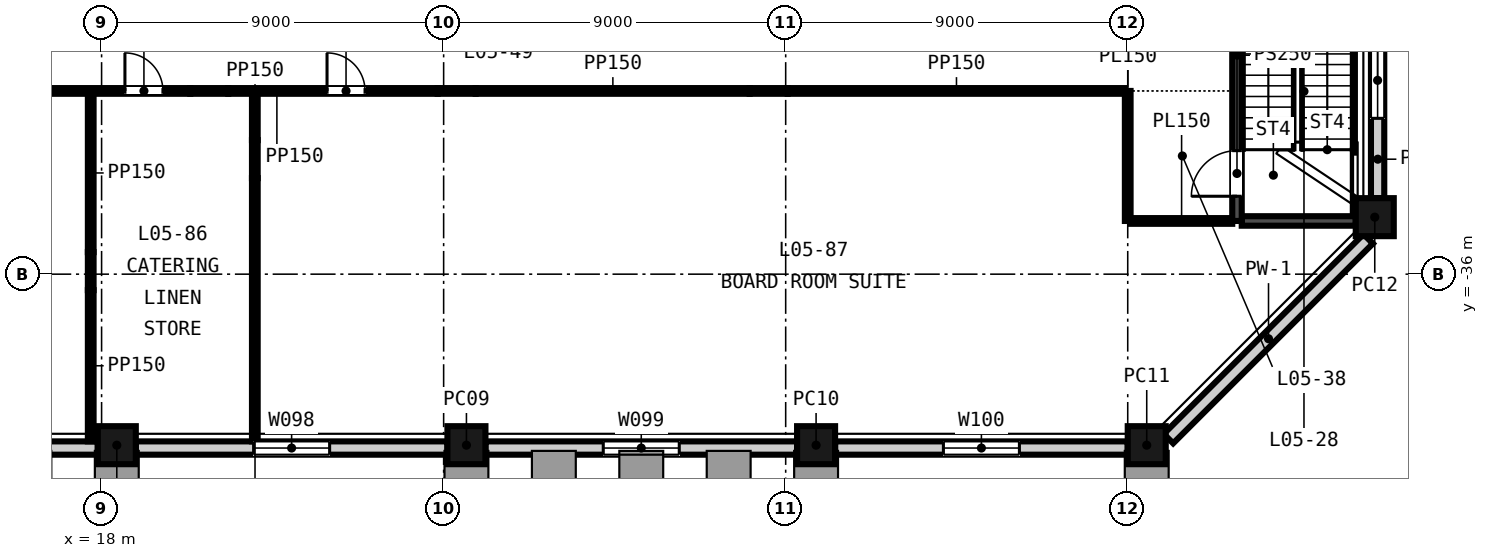
"""IFC4 building model, lengths in metres.
Left out: names, types, materials, properties, quantities, classifications, styles, units other than length and angle.
Written with IfcOpenShell. Run it as: python <this file> out.ifc"""

import sys

from ifc_helpers import new_model, si_unit, direction, frame, frame_2d, origin, origin_2d, place, context, subcontext, project, spatial, rectangle, extrude, element, fill, save


model = new_model("IFC4")
c1 = context("Model", 3, precision=1e-05, world=origin(), true_north=direction((0.0, 1.0)))
c2 = subcontext(c1, "Body", "Model", "MODEL_VIEW")
j1 = project(units=[si_unit("LENGTHUNIT", "METRE"), si_unit("PLANEANGLEUNIT", "RADIAN")], contexts=[c1])
p1 = place(None, origin())
s1 = spatial("IfcSite", under=j1, at=p1, CompositionType="ELEMENT")
p2 = place(p1, origin())
s2 = spatial("IfcBuilding", under=s1, at=p2, CompositionType="ELEMENT")
p3 = place(p2, frame((0.0, 0.0, 31.5)))
s3 = spatial("IfcBuildingStorey", under=s2, at=p3, CompositionType="ELEMENT", Elevation=31.5)
for number, where, z_axis, x_axis in (
    (1, (18.4, -40.5, -0.3), (0.0, 0.0, 1.0), (1.0, 0.0, 0.0)),
    (2, (27.6, -40.5, -0.3), (0.0, 0.0, 1.0), (1.0, 0.0, 0.0)),
    (3, (36.8, -40.5, -0.3), (0.0, 0.0, 1.0), (1.0, 0.0, 0.0)),
    (4, (45.5, -40.5, -0.3), (0.0, 0.0, 1.0), (1.0, 0.0, 0.0)),
    (5, (51.5, -34.5, -0.3), (0.0, 0.0, 1.0), (0.0, 1.0, 0.0)),
):
    element("IfcColumn", number, at=place(p3, frame(where, z_axis=z_axis, x_axis=x_axis)), inside=s3, PredefinedType="COLUMN", context=c2, shape_type="SweptSolid", body=[
        extrude(rectangle(XDim=1.0, YDim=1.0, at=origin_2d()), origin(), (0.0, 0.0, 1.0), 4.65),
    ])
p4 = place(p3, frame((9.7, -40.575, -0.3), z_axis=(0.0, 0.0, 1.0), x_axis=(1.0, 0.0, 0.0)))
e6 = element("IfcWall", 6, at=p4, inside=s3, PredefinedType="SOLIDWALL", context=c2, shape_type="SweptSolid", body=[
    extrude(rectangle(XDim=8.2, YDim=0.35, at=frame_2d((4.1, 0.0))), origin(), (0.0, 0.0, 1.0), 3.75),
])
p5 = place(p4, frame((3.1, 0.0, 1.2)))
e7 = element("IfcOpeningElement", 7, at=p5, cuts=e6, PredefinedType="OPENING", context=c2, shape_type="SweptSolid", body=[
    extrude(rectangle(XDim=2.0, YDim=2.5, at=frame_2d((1.0, 1.25))), frame((0.0, 0.185, 0.0), z_axis=(0.0, -1.0, 0.0), x_axis=(1.0, 0.0, 0.0)), (0.0, 0.0, 1.0), 0.37),
])
p6 = place(p3, frame((18.9, -40.575, -0.3), z_axis=(0.0, 0.0, 1.0), x_axis=(1.0, 0.0, 0.0)))
e8 = element("IfcWall", 8, at=p6, inside=s3, PredefinedType="SOLIDWALL", context=c2, shape_type="SweptSolid", body=[
    extrude(rectangle(XDim=8.2, YDim=0.35, at=frame_2d((4.1, 0.0))), origin(), (0.0, 0.0, 1.0), 3.75),
])
p7 = place(p6, frame((3.1, 0.0, 1.2)))
e9 = element("IfcOpeningElement", 9, at=p7, cuts=e8, PredefinedType="OPENING", context=c2, shape_type="SweptSolid", body=[
    extrude(rectangle(XDim=2.0, YDim=2.5, at=frame_2d((1.0, 1.25))), frame((0.0, 0.185, 0.0), z_axis=(0.0, -1.0, 0.0), x_axis=(1.0, 0.0, 0.0)), (0.0, 0.0, 1.0), 0.37),
])
p8 = place(p3, frame((28.1, -40.575, -0.3), z_axis=(0.0, 0.0, 1.0), x_axis=(1.0, 0.0, 0.0)))
e10 = element("IfcWall", 10, at=p8, inside=s3, PredefinedType="SOLIDWALL", context=c2, shape_type="SweptSolid", body=[
    extrude(rectangle(XDim=8.2, YDim=0.35, at=frame_2d((4.1, 0.0))), origin(), (0.0, 0.0, 1.0), 3.75),
])
p9 = place(p8, frame((3.1, 0.0, 1.2)))
e11 = element("IfcOpeningElement", 11, at=p9, cuts=e10, PredefinedType="OPENING", context=c2, shape_type="SweptSolid", body=[
    extrude(rectangle(XDim=2.0, YDim=2.5, at=frame_2d((1.0, 1.25))), frame((0.0, 0.185, 0.0), z_axis=(0.0, -1.0, 0.0), x_axis=(1.0, 0.0, 0.0)), (0.0, 0.0, 1.0), 0.37),
])
p10 = place(p3, frame((37.3, -40.575, -0.3), z_axis=(0.0, 0.0, 1.0), x_axis=(1.0, 0.0, 0.0)))
e12 = element("IfcWall", 12, at=p10, inside=s3, PredefinedType="SOLIDWALL", context=c2, shape_type="SweptSolid", body=[
    extrude(rectangle(XDim=7.7, YDim=0.35, at=frame_2d((3.85, 0.0))), origin(), (0.0, 0.0, 1.0), 3.75),
])
p11 = place(p10, frame((2.85, 0.0, 1.2)))
e13 = element("IfcOpeningElement", 13, at=p11, cuts=e12, PredefinedType="OPENING", context=c2, shape_type="SweptSolid", body=[
    extrude(rectangle(XDim=2.0, YDim=2.5, at=frame_2d((1.0, 1.25))), frame((0.0, 0.185, 0.0), z_axis=(0.0, -1.0, 0.0), x_axis=(1.0, 0.0, 0.0)), (0.0, 0.0, 1.0), 0.37),
])
p12 = place(p3, frame((46.072, -40.327, -0.3), z_axis=(0.0, 0.0, 1.0), x_axis=(0.707106781187, 0.707106781187, 0.0)))
e14 = element("IfcWall", 14, at=p12, inside=s3, PredefinedType="SOLIDWALL", context=c2, shape_type="SweptSolid", body=[
    extrude(rectangle(XDim=7.433, YDim=0.35, at=frame_2d((3.716, 0.0))), origin(), (0.0, 0.0, 1.0), 3.75),
])
p13 = place(p3, frame((51.575, -34.0, -0.3), z_axis=(0.0, 0.0, 1.0), x_axis=(0.0, 1.0, 0.0)))
e15 = element("IfcWall", 15, at=p13, inside=s3, PredefinedType="SOLIDWALL", context=c2, shape_type="SweptSolid", body=[
    extrude(rectangle(XDim=6.2, YDim=0.35, at=frame_2d((3.1, 0.0))), origin(), (0.0, 0.0, 1.0), 3.75),
])
p14 = place(p13, frame((2.1, 0.0, 1.2)))
e16 = element("IfcOpeningElement", 16, at=p14, cuts=e15, PredefinedType="OPENING", context=c2, shape_type="SweptSolid", body=[
    extrude(rectangle(XDim=2.0, YDim=2.5, at=frame_2d((1.0, 1.25))), frame((0.0, 0.185, 0.0), z_axis=(0.0, -1.0, 0.0), x_axis=(1.0, 0.0, 0.0)), (0.0, 0.0, 1.0), 0.37),
])
p15 = place(p3, frame((45.075, -34.6, 0.0), z_axis=(0.0, 0.0, 1.0), x_axis=(1.0, 0.0, 0.0)))
e17 = element("IfcWall", 17, at=p15, inside=s3, PredefinedType="PARTITIONING", context=c2, shape_type="SweptSolid", body=[
    extrude(rectangle(XDim=2.675, YDim=0.15, at=frame_2d((1.337, 0.0))), origin(), (0.0, 0.0, 1.0), 4.35),
])
p16 = place(p3, frame((48.0, -34.6, 0.0), z_axis=(0.0, 0.0, 1.0), x_axis=(1.0, 0.0, 0.0)))
e18 = element("IfcWall", 18, at=p16, inside=s3, PredefinedType="SHEAR", context=c2, shape_type="SweptSolid", body=[
    extrude(rectangle(XDim=3.0, YDim=0.25, at=frame_2d((1.5, 0.0))), origin(), (0.0, 0.0, 1.0), 4.35),
])
p17 = place(p3, frame((4.223, -31.179, 0.0), z_axis=(0.0, 0.0, 1.0), x_axis=(1.0, 0.0, 0.0)))
e19 = element("IfcWall", 19, at=p17, inside=s3, PredefinedType="PARTITIONING", context=c2, shape_type="SweptSolid", body=[
    extrude(rectangle(XDim=16.11, YDim=0.15, at=frame_2d((8.055, 0.0))), origin(), (0.0, 0.0, 1.0), 4.35),
])
p18 = place(p17, frame((1.9, 0.0, 0.0)))
e20 = element("IfcOpeningElement", 20, at=p18, cuts=e19, PredefinedType="OPENING", context=c2, shape_type="SweptSolid", body=[
    extrude(rectangle(XDim=1.0, YDim=2.1, at=frame_2d((0.5, 1.05))), frame((0.0, 0.085, 0.0), z_axis=(0.0, -1.0, 0.0), x_axis=(1.0, 0.0, 0.0)), (0.0, 0.0, 1.0), 0.17),
])
p19 = place(p17, frame((9.119, 0.0, 0.0)))
e21 = element("IfcOpeningElement", 21, at=p19, cuts=e19, PredefinedType="OPENING", context=c2, shape_type="SweptSolid", body=[
    extrude(rectangle(XDim=1.0, YDim=2.1, at=frame_2d((0.5, 1.05))), frame((0.0, 0.085, 0.0), z_axis=(0.0, -1.0, 0.0), x_axis=(1.0, 0.0, 0.0)), (0.0, 0.0, 1.0), 0.17),
])
p20 = place(p17, frame((14.391, 0.0, 0.0)))
e22 = element("IfcOpeningElement", 22, at=p20, cuts=e19, PredefinedType="OPENING", context=c2, shape_type="SweptSolid", body=[
    extrude(rectangle(XDim=1.0, YDim=2.1, at=frame_2d((0.5, 1.05))), frame((0.0, 0.085, 0.0), z_axis=(0.0, -1.0, 0.0), x_axis=(1.0, 0.0, 0.0)), (0.0, 0.0, 1.0), 0.17),
])
p21 = place(p3, frame((20.333, -31.179, 0.0), z_axis=(0.0, 0.0, 1.0), x_axis=(1.0, 0.0, 0.0)))
e23 = element("IfcWall", 23, at=p21, inside=s3, PredefinedType="PARTITIONING", context=c2, shape_type="SweptSolid", body=[
    extrude(rectangle(XDim=1.0, YDim=0.15, at=frame_2d((0.5, 0.0))), origin(), (0.0, 0.0, 1.0), 3.591),
])
p22 = place(p3, frame((21.333, -31.179, 0.0), z_axis=(0.0, 0.0, 1.0), x_axis=(1.0, 0.0, 0.0)))
e24 = element("IfcWall", 24, at=p22, inside=s3, PredefinedType="PARTITIONING", context=c2, shape_type="SweptSolid", body=[
    extrude(rectangle(XDim=5.51, YDim=0.15, at=frame_2d((2.755, 0.0))), origin(), (0.0, 0.0, 1.0), 4.35),
])
p23 = place(p22, frame((2.599, 0.0, 0.0)))
e25 = element("IfcOpeningElement", 25, at=p23, cuts=e24, PredefinedType="OPENING", context=c2, shape_type="SweptSolid", body=[
    extrude(rectangle(XDim=1.0, YDim=2.1, at=frame_2d((0.5, 1.05))), frame((0.0, 0.085, 0.0), z_axis=(0.0, -1.0, 0.0), x_axis=(1.0, 0.0, 0.0)), (0.0, 0.0, 1.0), 0.17),
])
p24 = place(p3, frame((26.843, -31.179, 0.0), z_axis=(0.0, 0.0, 1.0), x_axis=(1.0, 0.0, 0.0)))
e26 = element("IfcWall", 26, at=p24, inside=s3, PredefinedType="PARTITIONING", context=c2, shape_type="SweptSolid", body=[
    extrude(rectangle(XDim=1.0, YDim=0.15, at=frame_2d((0.5, 0.0))), origin(), (0.0, 0.0, 1.0), 3.436),
])
p25 = place(p3, frame((27.843, -31.179, 0.0), z_axis=(0.0, 0.0, 1.0), x_axis=(1.0, 0.0, 0.0)))
e27 = element("IfcWall", 27, at=p25, inside=s3, PredefinedType="PARTITIONING", context=c2, shape_type="SweptSolid", body=[
    extrude(rectangle(XDim=7.209, YDim=0.15, at=frame_2d((3.605, 0.0))), origin(), (0.0, 0.0, 1.0), 4.35),
])
p26 = place(p3, frame((35.053, -31.179, 0.0), z_axis=(0.0, 0.0, 1.0), x_axis=(1.0, 0.0, 0.0)))
e28 = element("IfcWall", 28, at=p26, inside=s3, PredefinedType="PARTITIONING", context=c2, shape_type="SweptSolid", body=[
    extrude(rectangle(XDim=1.0, YDim=0.15, at=frame_2d((0.5, 0.0))), origin(), (0.0, 0.0, 1.0), 3.261),
])
p27 = place(p3, frame((36.053, -31.179, 0.0), z_axis=(0.0, 0.0, 1.0), x_axis=(1.0, 0.0, 0.0)))
e29 = element("IfcWall", 29, at=p27, inside=s3, PredefinedType="PARTITIONING", context=c2, shape_type="SweptSolid", body=[
    extrude(rectangle(XDim=8.872, YDim=0.15, at=frame_2d((4.436, 0.0))), origin(), (0.0, 0.0, 1.0), 4.35),
])
p28 = place(p3, frame((17.714, -40.4, 0.0), z_axis=(0.0, 0.0, 1.0), x_axis=(0.0, 1.0, 0.0)))
e30 = element("IfcWall", 30, at=p28, inside=s3, PredefinedType="PARTITIONING", context=c2, shape_type="SweptSolid", body=[
    extrude(rectangle(XDim=3.979, YDim=0.15, at=frame_2d((1.99, 0.0))), origin(), (0.0, 0.0, 1.0), 4.35),
])
p29 = place(p3, frame((17.714, -36.42, 0.0), z_axis=(0.0, 0.0, 1.0), x_axis=(0.0, 1.0, 0.0)))
e31 = element("IfcWall", 31, at=p29, inside=s3, PredefinedType="PARTITIONING", context=c2, shape_type="SweptSolid", body=[
    extrude(rectangle(XDim=1.0, YDim=0.15, at=frame_2d((0.5, 0.0))), origin(), (0.0, 0.0, 1.0), 3.601),
])
p30 = place(p3, frame((17.714, -35.42, 0.0), z_axis=(0.0, 0.0, 1.0), x_axis=(0.0, 1.0, 0.0)))
e32 = element("IfcWall", 32, at=p30, inside=s3, PredefinedType="PARTITIONING", context=c2, shape_type="SweptSolid", body=[
    extrude(rectangle(XDim=4.167, YDim=0.15, at=frame_2d((2.083, 0.0))), origin(), (0.0, 0.0, 1.0), 4.35),
])
p31 = place(p3, frame((22.032, -40.4, 0.0), z_axis=(0.0, 0.0, 1.0), x_axis=(0.0, 1.0, 0.0)))
e33 = element("IfcWall", 33, at=p31, inside=s3, PredefinedType="PARTITIONING", context=c2, shape_type="SweptSolid", body=[
    extrude(rectangle(XDim=6.927, YDim=0.15, at=frame_2d((3.463, 0.0))), origin(), (0.0, 0.0, 1.0), 4.35),
])
p32 = place(p3, frame((22.032, -33.473, 0.0), z_axis=(0.0, 0.0, 1.0), x_axis=(0.0, 1.0, 0.0)))
e34 = element("IfcWall", 34, at=p32, inside=s3, PredefinedType="PARTITIONING", context=c2, shape_type="SweptSolid", body=[
    extrude(rectangle(XDim=1.0, YDim=0.15, at=frame_2d((0.5, 0.0))), origin(), (0.0, 0.0, 1.0), 3.591),
])
p33 = place(p3, frame((22.032, -32.473, 0.0), z_axis=(0.0, 0.0, 1.0), x_axis=(0.0, 1.0, 0.0)))
e35 = element("IfcWall", 35, at=p33, inside=s3, PredefinedType="PARTITIONING", context=c2, shape_type="SweptSolid", body=[
    extrude(rectangle(XDim=1.219, YDim=0.15, at=frame_2d((0.61, 0.0))), origin(), (0.0, 0.0, 1.0), 4.35),
])
p34 = place(p3, frame((45.0, -34.6, 0.0), z_axis=(0.0, 0.0, 1.0), x_axis=(0.0, 1.0, 0.0)))
e36 = element("IfcWall", 36, at=p34, inside=s3, PredefinedType="PARTITIONING", context=c2, shape_type="SweptSolid", body=[
    extrude(rectangle(XDim=3.421, YDim=0.15, at=frame_2d((1.71, 0.0))), origin(), (0.0, 0.0, 1.0), 4.35),
])
p35 = place(p3, frame((47.875, -34.6, 0.0), z_axis=(0.0, 0.0, 1.0), x_axis=(0.0, 1.0, 0.0)))
e37 = element("IfcWall", 37, at=p35, inside=s3, PredefinedType="SHEAR", context=c2, shape_type="SweptSolid", body=[
    extrude(rectangle(XDim=6.821, YDim=0.25, at=frame_2d((3.411, 0.0))), origin(), (0.0, 0.0, 1.0), 4.35),
])
p36 = place(p35, frame((0.65, 0.0, 0.0)))
e38 = element("IfcOpeningElement", 38, at=p36, cuts=e37, PredefinedType="OPENING", context=c2, shape_type="SweptSolid", body=[
    extrude(rectangle(XDim=1.2, YDim=2.1, at=frame_2d((0.6, 1.05))), frame((0.0, 0.135, 0.0), z_axis=(0.0, -1.0, 0.0), x_axis=(1.0, 0.0, 0.0)), (0.0, 0.0, 1.0), 0.27),
])
p37 = place(p7, origin())
e39 = element("IfcWindow", 39, at=p37, inside=s3, PartitioningType="SINGLE_PANEL", PredefinedType="WINDOW", context=c2, shape_type="SweptSolid", body=[
    extrude(rectangle(XDim=2.0, YDim=2.5, at=frame_2d((1.0, 1.25))), frame((0.0, 0.03, 0.0), z_axis=(0.0, -1.0, 0.0), x_axis=(1.0, 0.0, 0.0)), (0.0, 0.0, 1.0), 0.06),
])
fill(e9, e39)
p38 = place(p9, origin())
e40 = element("IfcWindow", 40, at=p38, inside=s3, PartitioningType="SINGLE_PANEL", PredefinedType="WINDOW", context=c2, shape_type="SweptSolid", body=[
    extrude(rectangle(XDim=2.0, YDim=2.5, at=frame_2d((1.0, 1.25))), frame((0.0, 0.03, 0.0), z_axis=(0.0, -1.0, 0.0), x_axis=(1.0, 0.0, 0.0)), (0.0, 0.0, 1.0), 0.06),
])
fill(e11, e40)
p39 = place(p11, origin())
e41 = element("IfcWindow", 41, at=p39, inside=s3, PartitioningType="SINGLE_PANEL", PredefinedType="WINDOW", context=c2, shape_type="SweptSolid", body=[
    extrude(rectangle(XDim=2.0, YDim=2.5, at=frame_2d((1.0, 1.25))), frame((0.0, 0.03, 0.0), z_axis=(0.0, -1.0, 0.0), x_axis=(1.0, 0.0, 0.0)), (0.0, 0.0, 1.0), 0.06),
])
fill(e13, e41)
p40 = place(p14, origin())
e42 = element("IfcWindow", 42, at=p40, inside=s3, PartitioningType="SINGLE_PANEL", PredefinedType="WINDOW", context=c2, shape_type="SweptSolid", body=[
    extrude(rectangle(XDim=2.0, YDim=2.5, at=frame_2d((1.0, 1.25))), frame((0.0, 0.03, 0.0), z_axis=(0.0, -1.0, 0.0), x_axis=(1.0, 0.0, 0.0)), (0.0, 0.0, 1.0), 0.06),
])
fill(e16, e42)
p41 = place(p36, origin())
e43 = element("IfcDoor", 43, at=p41, inside=s3, OperationType="SINGLE_SWING_LEFT", PredefinedType="DOOR", context=c2, shape_type="SweptSolid", body=[
    extrude(rectangle(XDim=1.2, YDim=2.1, at=frame_2d((0.6, 1.05))), frame((0.0, 0.025, 0.0), z_axis=(0.0, -1.0, 0.0), x_axis=(1.0, 0.0, 0.0)), (0.0, 0.0, 1.0), 0.05),
])
fill(e38, e43)
p42 = place(p20, origin())
e44 = element("IfcDoor", 44, at=p42, inside=s3, OperationType="SINGLE_SWING_LEFT", PredefinedType="DOOR", context=c2, shape_type="SweptSolid", body=[
    extrude(rectangle(XDim=1.0, YDim=2.1, at=frame_2d((0.5, 1.05))), frame((0.0, 0.025, 0.0), z_axis=(0.0, -1.0, 0.0), x_axis=(1.0, 0.0, 0.0)), (0.0, 0.0, 1.0), 0.05),
])
fill(e22, e44)
p43 = place(p23, origin())
e45 = element("IfcDoor", 45, at=p43, inside=s3, OperationType="SINGLE_SWING_LEFT", PredefinedType="DOOR", context=c2, shape_type="SweptSolid", body=[
    extrude(rectangle(XDim=1.0, YDim=2.1, at=frame_2d((0.5, 1.05))), frame((0.0, 0.025, 0.0), z_axis=(0.0, -1.0, 0.0), x_axis=(1.0, 0.0, 0.0)), (0.0, 0.0, 1.0), 0.05),
])
fill(e25, e45)
save(model, sys.argv[1])
